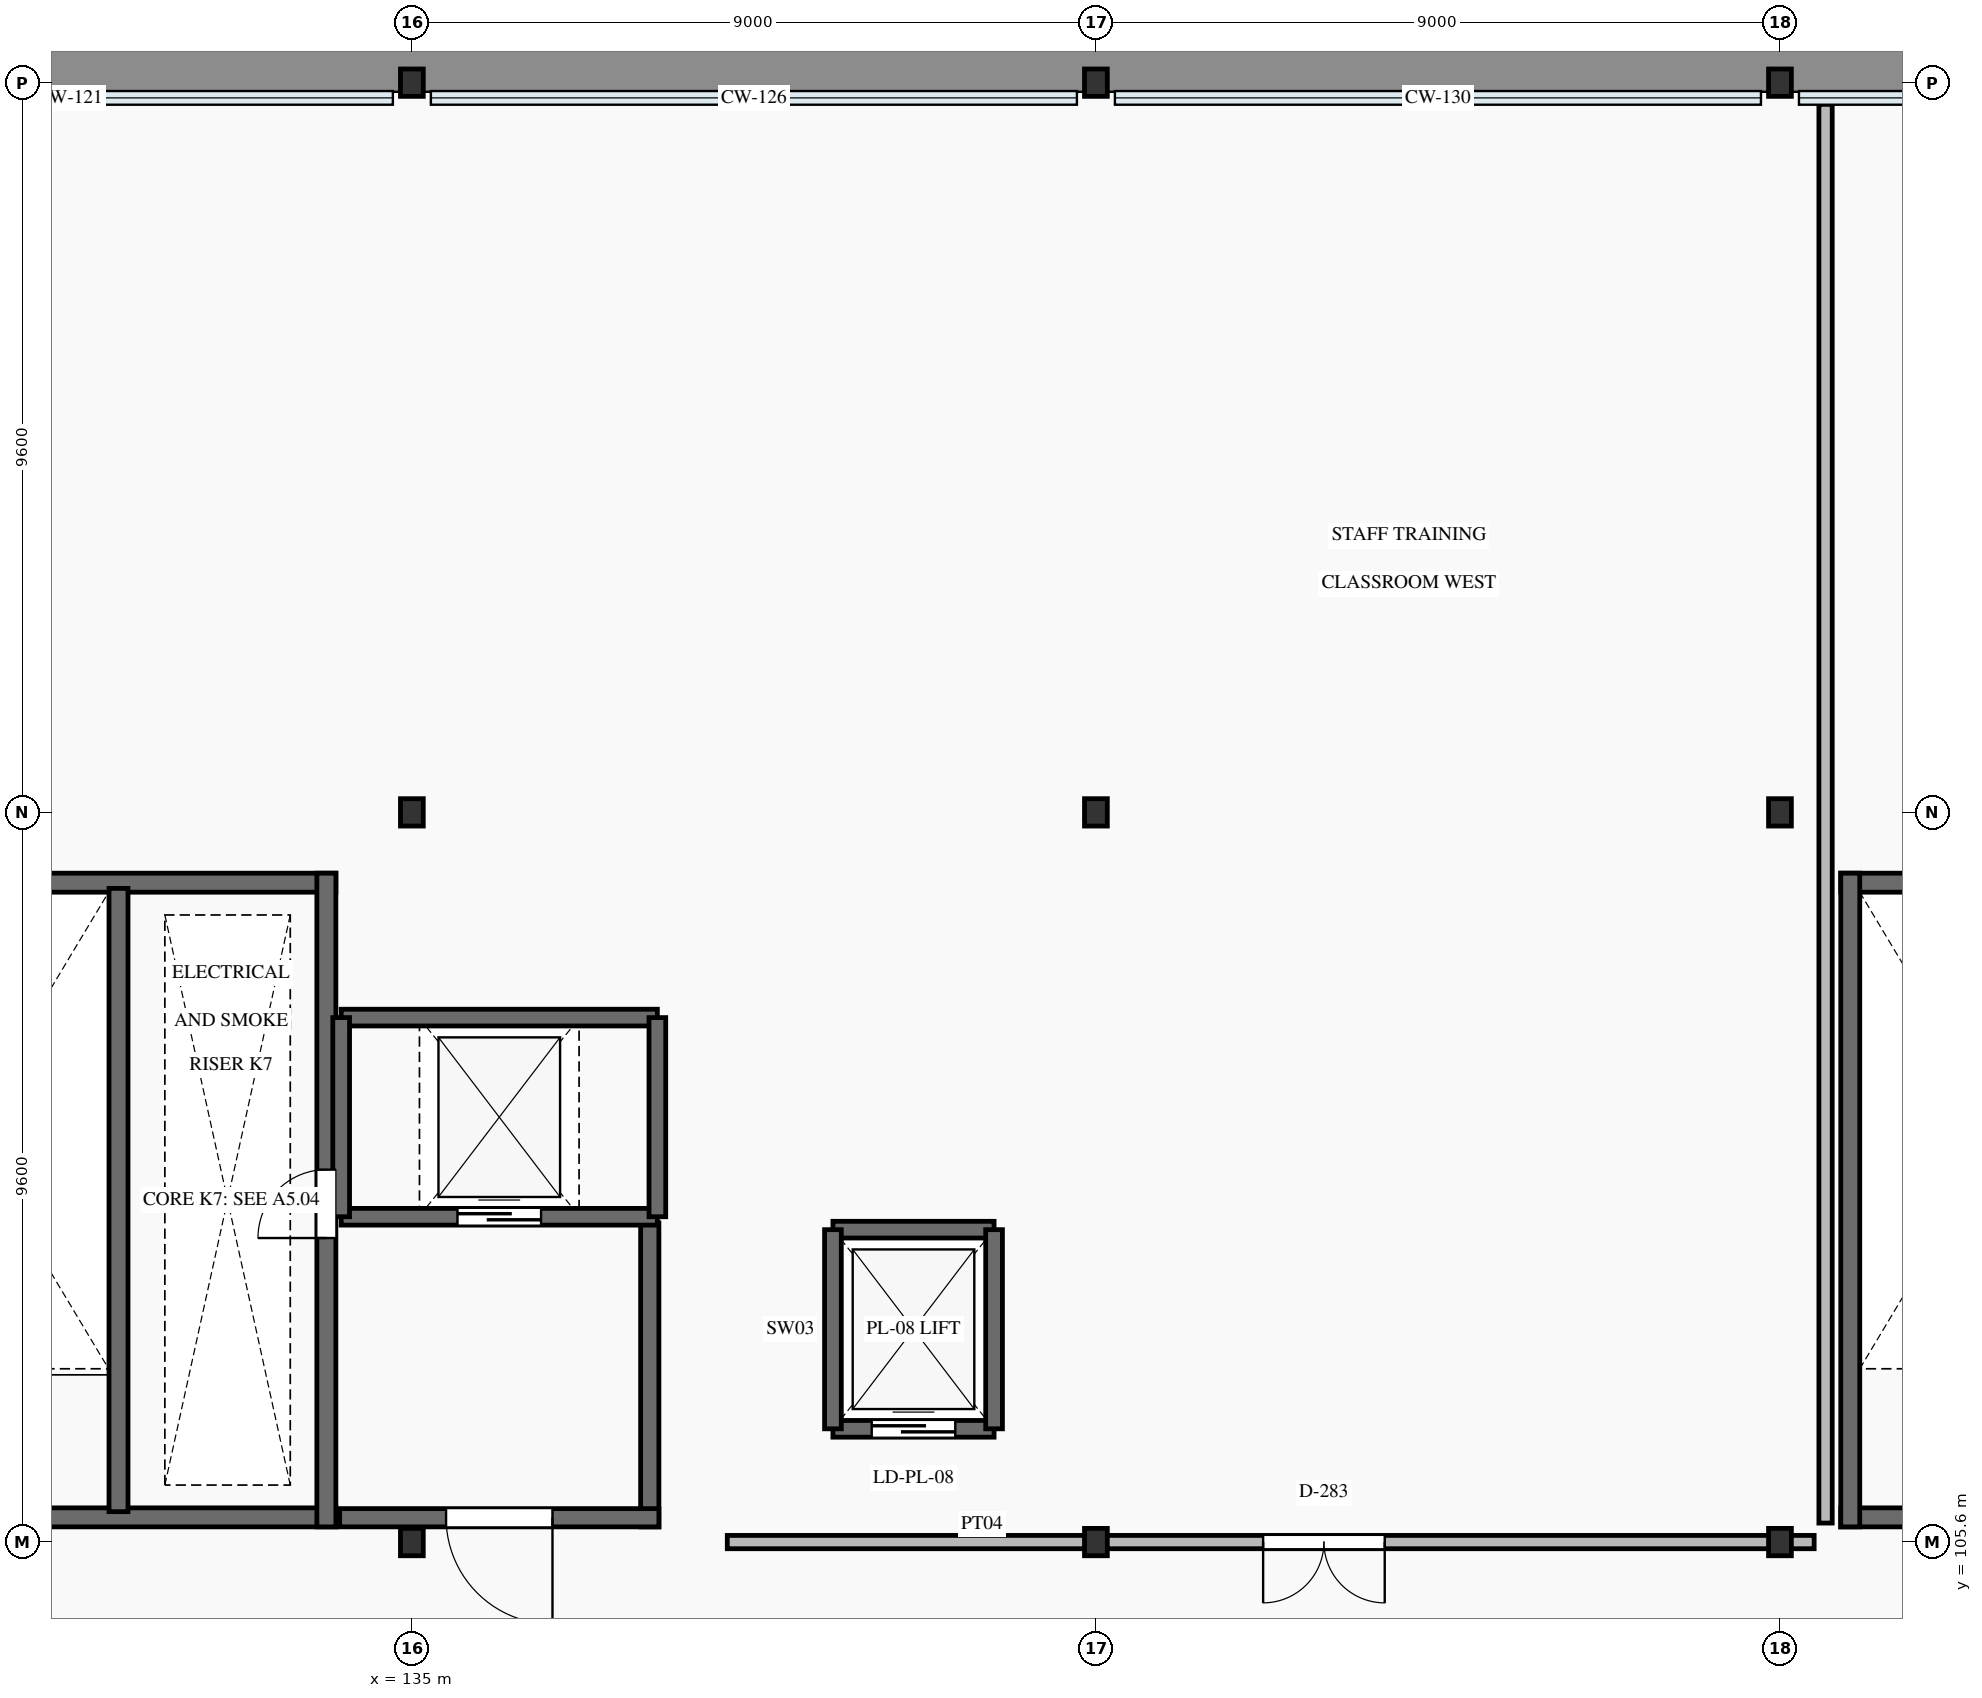
"""IFC4 building model, lengths in metres.
Left out: names, types, materials, properties, quantities, classifications, styles, units other than length and angle.
Written with IfcOpenShell. Run it as: python <this file> out.ifc"""

import sys

from ifc_helpers import new_model, si_unit, direction, frame, frame_2d, origin, origin_2d, place, context, subcontext, project, spatial, rectangle, i_section, extrude, element, fill, save


model = new_model("IFC4")
c1 = context("Model", 3, precision=1e-05, world=origin(), true_north=direction((0.0, 1.0)))
c2 = subcontext(c1, "Body", "Model", "MODEL_VIEW")
j1 = project(units=[si_unit("LENGTHUNIT", "METRE"), si_unit("PLANEANGLEUNIT", "RADIAN")], contexts=[c1])
p1 = place(None, origin())
s1 = spatial("IfcSite", under=j1, at=p1, CompositionType="ELEMENT")
p2 = place(p1, origin())
s2 = spatial("IfcBuilding", under=s1, at=p2, CompositionType="ELEMENT")
p3 = place(p2, frame((0.0, 0.0, 18.9)))
s3 = spatial("IfcBuildingStorey", under=s2, at=p3, CompositionType="ELEMENT", Elevation=18.9)
for number, where, z_axis, x_axis in (
    (1, (135.0, 105.6, 0.0), (0.0, 0.0, 1.0), (1.0, 0.0, 0.0)),
    (2, (135.0, 115.2, 0.0), (0.0, 0.0, 1.0), (1.0, 0.0, 0.0)),
    (3, (135.0, 124.8, 0.0), (0.0, 0.0, 1.0), (1.0, 0.0, 0.0)),
    (4, (144.0, 105.6, 0.0), (0.0, 0.0, 1.0), (1.0, 0.0, 0.0)),
    (5, (144.0, 115.2, 0.0), (0.0, 0.0, 1.0), (1.0, 0.0, 0.0)),
    (6, (144.0, 124.8, 0.0), (0.0, 0.0, 1.0), (1.0, 0.0, 0.0)),
    (7, (153.0, 105.6, 0.0), (0.0, 0.0, 1.0), (1.0, 0.0, 0.0)),
    (8, (153.0, 115.2, 0.0), (0.0, 0.0, 1.0), (1.0, 0.0, 0.0)),
    (9, (153.0, 124.8, 0.0), (0.0, 0.0, 1.0), (1.0, 0.0, 0.0)),
):
    element("IfcColumn", number, at=place(p3, frame(where, z_axis=z_axis, x_axis=x_axis)), inside=s3, PredefinedType="COLUMN", context=c2, shape_type="SweptSolid", body=[
        extrude(i_section(OverallWidth=0.3, OverallDepth=0.36, WebThickness=0.012, FlangeThickness=0.022, FilletRadius=0.027, at=origin_2d()), origin(), (0.0, 0.0, 1.0), 3.9),
    ])
p4 = place(p3, frame((127.0, 105.925, 0.0), z_axis=(0.0, 0.0, 1.0), x_axis=(1.0, 0.0, 0.0)))
e10 = element("IfcWall", 10, at=p4, inside=s3, PredefinedType="SHEAR", context=c2, shape_type="SweptSolid", body=[
    extrude(rectangle(XDim=7.0, YDim=0.25, at=frame_2d((3.5, 0.0))), origin(), (0.0, 0.0, 1.0), 3.9),
])
p5 = place(p4, frame((1.25, 0.0, 0.0)))
e11 = element("IfcOpeningElement", 11, at=p5, cuts=e10, PredefinedType="OPENING", context=c2, shape_type="SweptSolid", body=[
    extrude(rectangle(XDim=1.2, YDim=2.15, at=frame_2d((0.6, 1.075))), frame((0.0, 0.14, 0.0), z_axis=(0.0, -1.0, 0.0), x_axis=(1.0, 0.0, 0.0)), (0.0, 0.0, 1.0), 0.28),
])
p6 = place(p3, frame((127.0, 114.275, 0.0), z_axis=(0.0, 0.0, 1.0), x_axis=(1.0, 0.0, 0.0)))
e12 = element("IfcWall", 12, at=p6, inside=s3, PredefinedType="SHEAR", context=c2, shape_type="SweptSolid", body=[
    extrude(rectangle(XDim=7.0, YDim=0.25, at=frame_2d((3.5, 0.0))), origin(), (0.0, 0.0, 1.0), 3.9),
])
p7 = place(p3, frame((133.875, 105.8, 0.0), z_axis=(0.0, 0.0, 1.0), x_axis=(0.0, 1.0, 0.0)))
e13 = element("IfcWall", 13, at=p7, inside=s3, PredefinedType="SHEAR", context=c2, shape_type="SweptSolid", body=[
    extrude(rectangle(XDim=8.6, YDim=0.25, at=frame_2d((4.3, 0.0))), origin(), (0.0, 0.0, 1.0), 3.9),
])
p8 = place(p7, frame((3.8, 0.0, 0.0)))
e14 = element("IfcOpeningElement", 14, at=p8, cuts=e13, PredefinedType="OPENING", context=c2, shape_type="SweptSolid", body=[
    extrude(rectangle(XDim=0.9, YDim=2.05, at=frame_2d((0.45, 1.025))), frame((0.0, 0.14, 0.0), z_axis=(0.0, -1.0, 0.0), x_axis=(1.0, 0.0, 0.0)), (0.0, 0.0, 1.0), 0.28),
])
p9 = place(p3, frame((131.14, 106.0, 0.0), z_axis=(0.0, 0.0, 1.0), x_axis=(0.0, 1.0, 0.0)))
e15 = element("IfcWall", 15, at=p9, inside=s3, PredefinedType="SHEAR", context=c2, shape_type="SweptSolid", body=[
    extrude(rectangle(XDim=8.2, YDim=0.25, at=frame_2d((4.1, 0.0))), origin(), (0.0, 0.0, 1.0), 3.9),
])
p10 = place(p3, frame((138.13, 105.8, 0.0), z_axis=(0.0, 0.0, 1.0), x_axis=(0.0, 1.0, 0.0)))
e16 = element("IfcWall", 16, at=p10, inside=s3, PredefinedType="SHEAR", context=c2, shape_type="SweptSolid", body=[
    extrude(rectangle(XDim=4.0, YDim=0.24, at=frame_2d((2.0, 0.0))), origin(), (0.0, 0.0, 1.0), 3.9),
])
p11 = place(p3, frame((134.05, 105.92, 0.0), z_axis=(0.0, 0.0, 1.0), x_axis=(1.0, 0.0, 0.0)))
e17 = element("IfcWall", 17, at=p11, inside=s3, PredefinedType="SHEAR", context=c2, shape_type="SweptSolid", body=[
    extrude(rectangle(XDim=4.2, YDim=0.24, at=frame_2d((2.1, 0.0))), origin(), (0.0, 0.0, 1.0), 3.9),
])
p12 = place(p11, frame((1.4, 0.0, 0.0)))
e18 = element("IfcOpeningElement", 18, at=p12, cuts=e17, PredefinedType="OPENING", context=c2, shape_type="SweptSolid", body=[
    extrude(rectangle(XDim=1.4, YDim=2.2, at=frame_2d((0.7, 1.1))), frame((0.0, 0.135, 0.0), z_axis=(0.0, -1.0, 0.0), x_axis=(1.0, 0.0, 0.0)), (0.0, 0.0, 1.0), 0.27),
])
p13 = place(p3, frame((153.8, 105.925, 0.0), z_axis=(0.0, 0.0, 1.0), x_axis=(1.0, 0.0, 0.0)))
e19 = element("IfcWall", 19, at=p13, inside=s3, PredefinedType="SHEAR", context=c2, shape_type="SweptSolid", body=[
    extrude(rectangle(XDim=7.0, YDim=0.25, at=frame_2d((3.5, 0.0))), origin(), (0.0, 0.0, 1.0), 3.9),
])
p14 = place(p13, frame((1.25, 0.0, 0.0)))
e20 = element("IfcOpeningElement", 20, at=p14, cuts=e19, PredefinedType="OPENING", context=c2, shape_type="SweptSolid", body=[
    extrude(rectangle(XDim=1.2, YDim=2.15, at=frame_2d((0.6, 1.075))), frame((0.0, 0.14, 0.0), z_axis=(0.0, -1.0, 0.0), x_axis=(1.0, 0.0, 0.0)), (0.0, 0.0, 1.0), 0.28),
])
p15 = place(p3, frame((153.8, 114.275, 0.0), z_axis=(0.0, 0.0, 1.0), x_axis=(1.0, 0.0, 0.0)))
e21 = element("IfcWall", 21, at=p15, inside=s3, PredefinedType="SHEAR", context=c2, shape_type="SweptSolid", body=[
    extrude(rectangle(XDim=7.0, YDim=0.25, at=frame_2d((3.5, 0.0))), origin(), (0.0, 0.0, 1.0), 3.9),
])
p16 = place(p3, frame((153.925, 105.8, 0.0), z_axis=(0.0, 0.0, 1.0), x_axis=(0.0, 1.0, 0.0)))
e22 = element("IfcWall", 22, at=p16, inside=s3, PredefinedType="SHEAR", context=c2, shape_type="SweptSolid", body=[
    extrude(rectangle(XDim=8.6, YDim=0.25, at=frame_2d((4.3, 0.0))), origin(), (0.0, 0.0, 1.0), 3.9),
])
p17 = place(p3, frame((140.54, 107.09, 0.0), z_axis=(0.0, 0.0, 1.0), x_axis=(1.0, 0.0, 0.0)))
e23 = element("IfcWall", 23, at=p17, inside=s3, PredefinedType="SHEAR", context=c2, shape_type="SweptSolid", body=[
    extrude(rectangle(XDim=2.12, YDim=0.22, at=frame_2d((1.06, 0.0))), origin(), (0.0, 0.0, 1.0), 3.9),
])
p18 = place(p17, frame((0.51, 0.0, 0.0)))
e24 = element("IfcOpeningElement", 24, at=p18, cuts=e23, PredefinedType="OPENING", context=c2, shape_type="SweptSolid", body=[
    extrude(rectangle(XDim=1.1, YDim=2.15, at=frame_2d((0.55, 1.075))), frame((0.0, 0.125, 0.0), z_axis=(0.0, -1.0, 0.0), x_axis=(1.0, 0.0, 0.0)), (0.0, 0.0, 1.0), 0.25),
])
p19 = place(p3, frame((140.54, 109.71, 0.0), z_axis=(0.0, 0.0, 1.0), x_axis=(1.0, 0.0, 0.0)))
e25 = element("IfcWall", 25, at=p19, inside=s3, PredefinedType="SHEAR", context=c2, shape_type="SweptSolid", body=[
    extrude(rectangle(XDim=2.12, YDim=0.22, at=frame_2d((1.06, 0.0))), origin(), (0.0, 0.0, 1.0), 3.9),
])
for number, where, z_axis, x_axis in (
    (26, (140.54, 107.09, 0.0), (0.0, 0.0, 1.0), (0.0, 1.0, 0.0)),
    (27, (142.66, 107.09, 0.0), (0.0, 0.0, 1.0), (0.0, 1.0, 0.0)),
):
    element("IfcWall", number, at=place(p3, frame(where, z_axis=z_axis, x_axis=x_axis)), inside=s3, PredefinedType="SHEAR", context=c2, shape_type="SweptSolid", body=[
        extrude(rectangle(XDim=2.62, YDim=0.22, at=frame_2d((1.31, 0.0))), origin(), (0.0, 0.0, 1.0), 3.9),
    ])
p20 = place(p3, frame((134.07, 109.88, 0.0), z_axis=(0.0, 0.0, 1.0), x_axis=(1.0, 0.0, 0.0)))
e28 = element("IfcWall", 28, at=p20, inside=s3, PredefinedType="SHEAR", context=c2, shape_type="SweptSolid", body=[
    extrude(rectangle(XDim=4.16, YDim=0.22, at=frame_2d((2.08, 0.0))), origin(), (0.0, 0.0, 1.0), 3.9),
])
p21 = place(p20, frame((1.53, 0.0, 0.0)))
e29 = element("IfcOpeningElement", 29, at=p21, cuts=e28, PredefinedType="OPENING", context=c2, shape_type="SweptSolid", body=[
    extrude(rectangle(XDim=1.1, YDim=2.15, at=frame_2d((0.55, 1.075))), frame((0.0, 0.125, 0.0), z_axis=(0.0, -1.0, 0.0), x_axis=(1.0, 0.0, 0.0)), (0.0, 0.0, 1.0), 0.25),
])
p22 = place(p3, frame((134.07, 112.5, 0.0), z_axis=(0.0, 0.0, 1.0), x_axis=(1.0, 0.0, 0.0)))
e30 = element("IfcWall", 30, at=p22, inside=s3, PredefinedType="SHEAR", context=c2, shape_type="SweptSolid", body=[
    extrude(rectangle(XDim=4.16, YDim=0.22, at=frame_2d((2.08, 0.0))), origin(), (0.0, 0.0, 1.0), 3.9),
])
for number, where, z_axis, x_axis in (
    (31, (134.07, 109.88, 0.0), (0.0, 0.0, 1.0), (0.0, 1.0, 0.0)),
    (32, (138.23, 109.88, 0.0), (0.0, 0.0, 1.0), (0.0, 1.0, 0.0)),
):
    element("IfcWall", number, at=place(p3, frame(where, z_axis=z_axis, x_axis=x_axis)), inside=s3, PredefinedType="SHEAR", context=c2, shape_type="SweptSolid", body=[
        extrude(rectangle(XDim=2.62, YDim=0.22, at=frame_2d((1.31, 0.0))), origin(), (0.0, 0.0, 1.0), 3.9),
    ])
p23 = place(p3, frame((139.15, 105.6, 0.0), z_axis=(0.0, 0.0, 1.0), x_axis=(1.0, 0.0, 0.0)))
e33 = element("IfcWall", 33, at=p23, inside=s3, PredefinedType="PARTITIONING", context=c2, shape_type="SweptSolid", body=[
    extrude(rectangle(XDim=14.3, YDim=0.175, at=frame_2d((7.15, 0.0))), origin(), (0.0, 0.0, 1.0), 3.135),
])
p24 = place(p23, frame((7.05, 0.0, 0.0)))
e34 = element("IfcOpeningElement", 34, at=p24, cuts=e33, PredefinedType="OPENING", context=c2, shape_type="SweptSolid", body=[
    extrude(rectangle(XDim=1.6, YDim=2.25, at=frame_2d((0.8, 1.125))), frame((0.0, 0.103, 0.0), z_axis=(0.0, -1.0, 0.0), x_axis=(1.0, 0.0, 0.0)), (0.0, 0.0, 1.0), 0.205),
])
p25 = place(p3, frame((153.6, 105.85, 0.0), z_axis=(0.0, 0.0, 1.0), x_axis=(0.0, 1.0, 0.0)))
e35 = element("IfcWall", 35, at=p25, inside=s3, PredefinedType="PARTITIONING", context=c2, shape_type="SweptSolid", body=[
    extrude(rectangle(XDim=18.665, YDim=0.175, at=frame_2d((9.333, 0.0))), origin(), (0.0, 0.0, 1.0), 3.64),
])
p26 = place(p8, origin())
e36 = element("IfcDoor", 36, at=p26, inside=s3, OperationType="SINGLE_SWING_LEFT", PredefinedType="DOOR", context=c2, shape_type="SweptSolid", body=[
    extrude(rectangle(XDim=0.9, YDim=2.05, at=frame_2d((0.45, 1.025))), frame((0.0, 0.025, 0.0), z_axis=(0.0, -1.0, 0.0), x_axis=(1.0, 0.0, 0.0)), (0.0, 0.0, 1.0), 0.05),
])
fill(e14, e36)
p27 = place(p12, frame((1.4, 0.0, 0.0), z_axis=(0.0, 0.0, 1.0), x_axis=(-1.0, 0.0, 0.0)))
e37 = element("IfcDoor", 37, at=p27, inside=s3, OperationType="SINGLE_SWING_RIGHT", PredefinedType="DOOR", context=c2, shape_type="SweptSolid", body=[
    extrude(rectangle(XDim=1.4, YDim=2.2, at=frame_2d((0.7, 1.1))), frame((0.0, 0.025, 0.0), z_axis=(0.0, -1.0, 0.0), x_axis=(1.0, 0.0, 0.0)), (0.0, 0.0, 1.0), 0.05),
])
fill(e18, e37)
p28 = place(p18, origin())
e38 = element("IfcDoor", 38, at=p28, inside=s3, OperationType="SLIDING_TO_LEFT", PredefinedType="DOOR", context=c2, shape_type="SweptSolid", body=[
    extrude(rectangle(XDim=1.1, YDim=2.15, at=frame_2d((0.55, 1.075))), frame((0.0, 0.025, 0.0), z_axis=(0.0, -1.0, 0.0), x_axis=(1.0, 0.0, 0.0)), (0.0, 0.0, 1.0), 0.05),
])
fill(e24, e38)
p29 = place(p21, origin())
e39 = element("IfcDoor", 39, at=p29, inside=s3, OperationType="SLIDING_TO_LEFT", PredefinedType="DOOR", context=c2, shape_type="SweptSolid", body=[
    extrude(rectangle(XDim=1.1, YDim=2.15, at=frame_2d((0.55, 1.075))), frame((0.0, 0.025, 0.0), z_axis=(0.0, -1.0, 0.0), x_axis=(1.0, 0.0, 0.0)), (0.0, 0.0, 1.0), 0.05),
])
fill(e29, e39)
p30 = place(p24, frame((1.6, 0.0, 0.0), z_axis=(0.0, 0.0, 1.0), x_axis=(-1.0, 0.0, 0.0)))
e40 = element("IfcDoor", 40, at=p30, inside=s3, OperationType="DOUBLE_DOOR_SINGLE_SWING", PredefinedType="DOOR", context=c2, shape_type="SweptSolid", body=[
    extrude(rectangle(XDim=1.6, YDim=2.25, at=frame_2d((0.8, 1.125))), frame((0.0, 0.025, 0.0), z_axis=(0.0, -1.0, 0.0), x_axis=(1.0, 0.0, 0.0)), (0.0, 0.0, 1.0), 0.05),
])
fill(e34, e40)
save(model, sys.argv[1])
